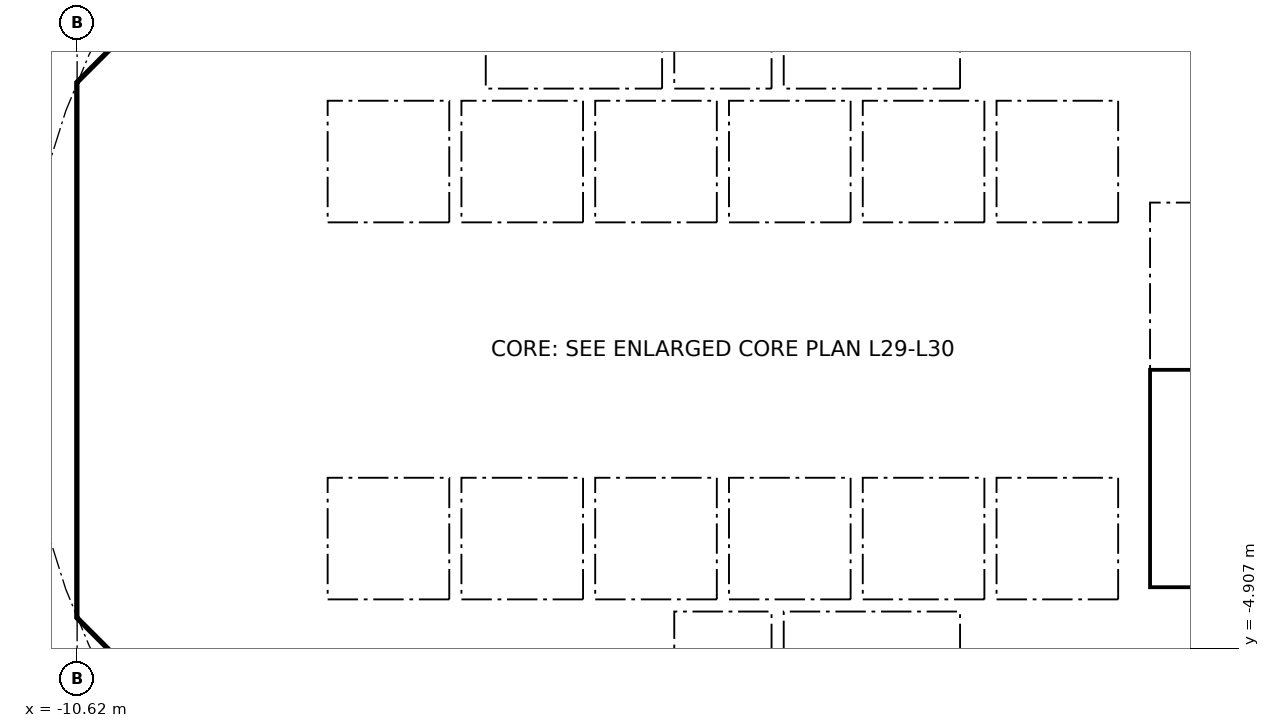
"""IFC4 building model, lengths in metres.
Left out: names, types, materials, properties, quantities, classifications, styles, units other than length and angle.
Written with IfcOpenShell. Run it as: python <this file> out.ifc"""

import sys

from ifc_helpers import new_model, si_unit, direction, frame, frame_2d, origin, place, context, subcontext, project, spatial, polyline, rectangle, outline, extrude, element, fill, save


model = new_model("IFC4")
c1 = context("Model", 3, precision=1e-05, world=origin(), true_north=direction((0.0, 1.0)))
c2 = subcontext(c1, "Body", "Model", "MODEL_VIEW")
j1 = project(units=[si_unit("LENGTHUNIT", "METRE"), si_unit("PLANEANGLEUNIT", "RADIAN")], contexts=[c1])
p1 = place(None, origin())
s1 = spatial("IfcSite", under=j1, at=p1, CompositionType="ELEMENT")
p2 = place(p1, origin())
s2 = spatial("IfcBuilding", under=s1, at=p2, CompositionType="ELEMENT")
p3 = place(p2, frame((0.0, 0.0, 119.6)))
s3 = spatial("IfcBuildingStorey", under=s2, at=p3, CompositionType="ELEMENT", Elevation=119.6)
p4 = place(p3, frame((9.988, 4.613, 0.0), z_axis=(0.0, 0.0, 1.0), x_axis=(-0.707106781187, 0.707106781187, 0.0)))
e1 = element("IfcWall", 1, at=p4, inside=s3, PredefinedType="SHEAR", context=c2, shape_type="SweptSolid", body=[
    extrude(rectangle(XDim=7.602, YDim=0.6, at=frame_2d((3.801, 0.0))), origin(), (0.0, 0.0, 1.0), 3.44),
])
p5 = place(p4, frame((3.201, 0.0, 0.0)))
e2 = element("IfcOpeningElement", 2, at=p5, cuts=e1, PredefinedType="OPENING", context=c2, shape_type="SweptSolid", body=[
    extrude(rectangle(XDim=1.2, YDim=2.1, at=frame_2d((0.6, 1.05))), frame((0.0, 0.31, 0.0), z_axis=(0.0, -1.0, 0.0), x_axis=(1.0, 0.0, 0.0)), (0.0, 0.0, 1.0), 0.62),
])
p6 = place(p3, frame((-4.613, 9.988, 0.0), z_axis=(0.0, 0.0, 1.0), x_axis=(-0.707106781187, -0.707106781187, 0.0)))
e3 = element("IfcWall", 3, at=p6, inside=s3, PredefinedType="SHEAR", context=c2, shape_type="SweptSolid", body=[
    extrude(rectangle(XDim=7.602, YDim=0.6, at=frame_2d((3.801, 0.0))), origin(), (0.0, 0.0, 1.0), 3.44),
])
p7 = place(p6, frame((0.351, 0.0, 0.0)))
e4 = element("IfcOpeningElement", 4, at=p7, cuts=e3, PredefinedType="OPENING", context=c2, shape_type="SweptSolid", body=[
    extrude(rectangle(XDim=1.1, YDim=2.1, at=frame_2d((0.55, 1.05))), frame((0.0, 0.31, 0.0), z_axis=(0.0, -1.0, 0.0), x_axis=(1.0, 0.0, 0.0)), (0.0, 0.0, 1.0), 0.62),
])
p8 = place(p3, frame((-10.325, 3.801, 0.0), z_axis=(0.0, 0.0, 1.0), x_axis=(0.0, -1.0, 0.0)))
e5 = element("IfcWall", 5, at=p8, inside=s3, PredefinedType="SHEAR", context=c2, shape_type="SweptSolid", body=[
    extrude(rectangle(XDim=7.602, YDim=0.6, at=frame_2d((3.801, 0.0))), origin(), (0.0, 0.0, 1.0), 3.44),
])
p9 = place(p8, frame((0.651, 0.0, 0.0)))
e6 = element("IfcOpeningElement", 6, at=p9, cuts=e5, PredefinedType="OPENING", context=c2, shape_type="SweptSolid", body=[
    extrude(rectangle(XDim=1.5, YDim=2.1, at=frame_2d((0.75, 1.05))), frame((0.0, 0.31, 0.0), z_axis=(0.0, -1.0, 0.0), x_axis=(1.0, 0.0, 0.0)), (0.0, 0.0, 1.0), 0.62),
])
p10 = place(p8, frame((5.451, 0.0, 0.0)))
e7 = element("IfcOpeningElement", 7, at=p10, cuts=e5, PredefinedType="OPENING", context=c2, shape_type="SweptSolid", body=[
    extrude(rectangle(XDim=1.5, YDim=2.1, at=frame_2d((0.75, 1.05))), frame((0.0, 0.31, 0.0), z_axis=(0.0, -1.0, 0.0), x_axis=(1.0, 0.0, 0.0)), (0.0, 0.0, 1.0), 0.62),
])
p11 = place(p3, frame((-9.988, -4.613, 0.0), z_axis=(0.0, 0.0, 1.0), x_axis=(0.707106781187, -0.707106781187, 0.0)))
e8 = element("IfcWall", 8, at=p11, inside=s3, PredefinedType="SHEAR", context=c2, shape_type="SweptSolid", body=[
    extrude(rectangle(XDim=7.602, YDim=0.6, at=frame_2d((3.801, 0.0))), origin(), (0.0, 0.0, 1.0), 3.44),
])
p12 = place(p11, frame((6.151, 0.0, 0.0)))
e9 = element("IfcOpeningElement", 9, at=p12, cuts=e8, PredefinedType="OPENING", context=c2, shape_type="SweptSolid", body=[
    extrude(rectangle(XDim=1.1, YDim=2.1, at=frame_2d((0.55, 1.05))), frame((0.0, 0.31, 0.0), z_axis=(0.0, -1.0, 0.0), x_axis=(1.0, 0.0, 0.0)), (0.0, 0.0, 1.0), 0.62),
])
p13 = place(p3, frame((4.613, -9.988, 0.0), z_axis=(0.0, 0.0, 1.0), x_axis=(0.707106781187, 0.707106781187, 0.0)))
e10 = element("IfcWall", 10, at=p13, inside=s3, PredefinedType="SHEAR", context=c2, shape_type="SweptSolid", body=[
    extrude(rectangle(XDim=7.602, YDim=0.6, at=frame_2d((3.801, 0.0))), origin(), (0.0, 0.0, 1.0), 3.44),
])
p14 = place(p13, frame((3.201, 0.0, 0.0)))
e11 = element("IfcOpeningElement", 11, at=p14, cuts=e10, PredefinedType="OPENING", context=c2, shape_type="SweptSolid", body=[
    extrude(rectangle(XDim=1.2, YDim=2.1, at=frame_2d((0.6, 1.05))), frame((0.0, 0.31, 0.0), z_axis=(0.0, -1.0, 0.0), x_axis=(1.0, 0.0, 0.0)), (0.0, 0.0, 1.0), 0.62),
])
p15 = place(p3, frame((-5.8, 4.3, 0.0), z_axis=(0.0, 0.0, 1.0), x_axis=(0.0, 1.0, 0.0)))
e12 = element("IfcWall", 12, at=p15, inside=s3, PredefinedType="PARTITIONING", context=c2, shape_type="SweptSolid", body=[
    extrude(rectangle(XDim=3.927, YDim=0.15, at=frame_2d((1.963, 0.0))), origin(), (0.0, 0.0, 1.0), 3.44),
])
p16 = place(p15, frame((1.551, 0.0, 0.0)))
e13 = element("IfcOpeningElement", 13, at=p16, cuts=e12, PredefinedType="OPENING", context=c2, shape_type="SweptSolid", body=[
    extrude(rectangle(XDim=0.9, YDim=2.1, at=frame_2d((0.45, 1.05))), frame((0.0, 0.085, 0.0), z_axis=(0.0, -1.0, 0.0), x_axis=(1.0, 0.0, 0.0)), (0.0, 0.0, 1.0), 0.17),
])
p17 = place(p3, frame((4.0, 4.3, 0.0), z_axis=(0.0, 0.0, 1.0), x_axis=(0.0, 1.0, 0.0)))
e14 = element("IfcWall", 14, at=p17, inside=s3, PredefinedType="SOLIDWALL", context=c2, shape_type="SweptSolid", body=[
    extrude(rectangle(XDim=2.2, YDim=0.2, at=frame_2d((1.1, 0.0))), origin(), (0.0, 0.0, 1.0), 3.44),
])
p18 = place(p17, frame((0.55, 0.0, 0.0)))
e15 = element("IfcOpeningElement", 15, at=p18, cuts=e14, PredefinedType="OPENING", context=c2, shape_type="SweptSolid", body=[
    extrude(rectangle(XDim=1.1, YDim=2.1, at=frame_2d((0.55, 1.05))), frame((0.0, 0.11, 0.0), z_axis=(0.0, -1.0, 0.0), x_axis=(1.0, 0.0, 0.0)), (0.0, 0.0, 1.0), 0.22),
])
p19 = place(p3, frame((-4.0, 4.3, 0.0), z_axis=(0.0, 0.0, 1.0), x_axis=(0.0, 1.0, 0.0)))
e16 = element("IfcWall", 16, at=p19, inside=s3, PredefinedType="SOLIDWALL", context=c2, shape_type="SweptSolid", body=[
    extrude(rectangle(XDim=2.2, YDim=0.2, at=frame_2d((1.1, 0.0))), origin(), (0.0, 0.0, 1.0), 3.44),
])
p20 = place(p19, frame((0.55, 0.0, 0.0)))
e17 = element("IfcOpeningElement", 17, at=p20, cuts=e16, PredefinedType="OPENING", context=c2, shape_type="SweptSolid", body=[
    extrude(rectangle(XDim=1.1, YDim=2.1, at=frame_2d((0.55, 1.05))), frame((0.0, 0.11, 0.0), z_axis=(0.0, -1.0, 0.0), x_axis=(1.0, 0.0, 0.0)), (0.0, 0.0, 1.0), 0.22),
])
p21 = place(p3, frame((-6.7, 2.0, 0.0), z_axis=(0.0, 0.0, 1.0), x_axis=(1.0, 0.0, 0.0)))
e18 = element("IfcWall", 18, at=p21, inside=s3, PredefinedType="SOLIDWALL", context=c2, shape_type="SweptSolid", body=[
    extrude(rectangle(XDim=13.4, YDim=0.2, at=frame_2d((6.7, 0.0))), origin(), (0.0, 0.0, 1.0), 3.44),
])
p22 = place(p21, frame((0.65, 0.0, 0.0)))
e19 = element("IfcOpeningElement", 19, at=p22, cuts=e18, PredefinedType="OPENING", context=c2, shape_type="SweptSolid", body=[
    extrude(rectangle(XDim=1.1, YDim=2.1, at=frame_2d((0.55, 1.05))), frame((0.0, 0.11, 0.0), z_axis=(0.0, -1.0, 0.0), x_axis=(1.0, 0.0, 0.0)), (0.0, 0.0, 1.0), 0.22),
])
p23 = place(p21, frame((2.85, 0.0, 0.0)))
e20 = element("IfcOpeningElement", 20, at=p23, cuts=e18, PredefinedType="OPENING", context=c2, shape_type="SweptSolid", body=[
    extrude(rectangle(XDim=1.1, YDim=2.1, at=frame_2d((0.55, 1.05))), frame((0.0, 0.11, 0.0), z_axis=(0.0, -1.0, 0.0), x_axis=(1.0, 0.0, 0.0)), (0.0, 0.0, 1.0), 0.22),
])
p24 = place(p21, frame((5.05, 0.0, 0.0)))
e21 = element("IfcOpeningElement", 21, at=p24, cuts=e18, PredefinedType="OPENING", context=c2, shape_type="SweptSolid", body=[
    extrude(rectangle(XDim=1.1, YDim=2.1, at=frame_2d((0.55, 1.05))), frame((0.0, 0.11, 0.0), z_axis=(0.0, -1.0, 0.0), x_axis=(1.0, 0.0, 0.0)), (0.0, 0.0, 1.0), 0.22),
])
p25 = place(p3, frame((6.7, 4.0, 0.0), z_axis=(0.0, 0.0, 1.0), x_axis=(1.0, 0.0, 0.0)))
e22 = element("IfcWall", 22, at=p25, inside=s3, PredefinedType="SOLIDWALL", context=c2, shape_type="SweptSolid", body=[
    extrude(rectangle(XDim=3.325, YDim=0.2, at=frame_2d((1.662, 0.0))), origin(), (0.0, 0.0, 1.0), 3.44),
])
p26 = place(p25, frame((1.25, 0.0, 0.0)))
e23 = element("IfcOpeningElement", 23, at=p26, cuts=e22, PredefinedType="OPENING", context=c2, shape_type="SweptSolid", body=[
    extrude(rectangle(XDim=1.1, YDim=2.1, at=frame_2d((0.55, 1.05))), frame((0.0, 0.11, 0.0), z_axis=(0.0, -1.0, 0.0), x_axis=(1.0, 0.0, 0.0)), (0.0, 0.0, 1.0), 0.22),
])
p27 = place(p3, frame((-5.8, -8.227, 0.0), z_axis=(0.0, 0.0, 1.0), x_axis=(0.0, 1.0, 0.0)))
e24 = element("IfcWall", 24, at=p27, inside=s3, PredefinedType="PARTITIONING", context=c2, shape_type="SweptSolid", body=[
    extrude(rectangle(XDim=3.927, YDim=0.15, at=frame_2d((1.963, 0.0))), origin(), (0.0, 0.0, 1.0), 3.44),
])
p28 = place(p27, frame((1.476, 0.0, 0.0)))
e25 = element("IfcOpeningElement", 25, at=p28, cuts=e24, PredefinedType="OPENING", context=c2, shape_type="SweptSolid", body=[
    extrude(rectangle(XDim=0.9, YDim=2.1, at=frame_2d((0.45, 1.05))), frame((0.0, 0.085, 0.0), z_axis=(0.0, -1.0, 0.0), x_axis=(1.0, 0.0, 0.0)), (0.0, 0.0, 1.0), 0.17),
])
p29 = place(p3, frame((4.0, -6.5, 0.0), z_axis=(0.0, 0.0, 1.0), x_axis=(0.0, 1.0, 0.0)))
e26 = element("IfcWall", 26, at=p29, inside=s3, PredefinedType="SOLIDWALL", context=c2, shape_type="SweptSolid", body=[
    extrude(rectangle(XDim=2.2, YDim=0.2, at=frame_2d((1.1, 0.0))), origin(), (0.0, 0.0, 1.0), 3.44),
])
p30 = place(p29, frame((0.55, 0.0, 0.0)))
e27 = element("IfcOpeningElement", 27, at=p30, cuts=e26, PredefinedType="OPENING", context=c2, shape_type="SweptSolid", body=[
    extrude(rectangle(XDim=1.1, YDim=2.1, at=frame_2d((0.55, 1.05))), frame((0.0, 0.11, 0.0), z_axis=(0.0, -1.0, 0.0), x_axis=(1.0, 0.0, 0.0)), (0.0, 0.0, 1.0), 0.22),
])
p31 = place(p3, frame((-4.0, -6.5, 0.0), z_axis=(0.0, 0.0, 1.0), x_axis=(0.0, 1.0, 0.0)))
e28 = element("IfcWall", 28, at=p31, inside=s3, PredefinedType="SOLIDWALL", context=c2, shape_type="SweptSolid", body=[
    extrude(rectangle(XDim=2.2, YDim=0.2, at=frame_2d((1.1, 0.0))), origin(), (0.0, 0.0, 1.0), 3.44),
])
p32 = place(p31, frame((0.65, 0.0, 0.0)))
e29 = element("IfcOpeningElement", 29, at=p32, cuts=e28, PredefinedType="OPENING", context=c2, shape_type="SweptSolid", body=[
    extrude(rectangle(XDim=0.9, YDim=2.1, at=frame_2d((0.45, 1.05))), frame((0.0, 0.11, 0.0), z_axis=(0.0, -1.0, 0.0), x_axis=(1.0, 0.0, 0.0)), (0.0, 0.0, 1.0), 0.22),
])
p33 = place(p3, frame((-6.7, -2.0, 0.0), z_axis=(0.0, 0.0, 1.0), x_axis=(1.0, 0.0, 0.0)))
e30 = element("IfcWall", 30, at=p33, inside=s3, PredefinedType="SOLIDWALL", context=c2, shape_type="SweptSolid", body=[
    extrude(rectangle(XDim=13.4, YDim=0.2, at=frame_2d((6.7, 0.0))), origin(), (0.0, 0.0, 1.0), 3.44),
])
p34 = place(p33, frame((0.65, 0.0, 0.0)))
e31 = element("IfcOpeningElement", 31, at=p34, cuts=e30, PredefinedType="OPENING", context=c2, shape_type="SweptSolid", body=[
    extrude(rectangle(XDim=1.1, YDim=2.1, at=frame_2d((0.55, 1.05))), frame((0.0, 0.11, 0.0), z_axis=(0.0, -1.0, 0.0), x_axis=(1.0, 0.0, 0.0)), (0.0, 0.0, 1.0), 0.22),
])
p35 = place(p33, frame((2.85, 0.0, 0.0)))
e32 = element("IfcOpeningElement", 32, at=p35, cuts=e30, PredefinedType="OPENING", context=c2, shape_type="SweptSolid", body=[
    extrude(rectangle(XDim=1.1, YDim=2.1, at=frame_2d((0.55, 1.05))), frame((0.0, 0.11, 0.0), z_axis=(0.0, -1.0, 0.0), x_axis=(1.0, 0.0, 0.0)), (0.0, 0.0, 1.0), 0.22),
])
p36 = place(p3, origin())
e33 = element("IfcWall", 33, at=p36, inside=s3, PredefinedType="SHEAR", context=c2, shape_type="SweptSolid", body=[
    extrude(outline(polyline([(-10.625, -3.801), (-10.025, -3.801), (-10.025, -4.152), (-9.776, -4.401), (-10.2, -4.825), (-10.625, -4.401), (-10.625, -3.801)])), origin(), (0.0, 0.0, 1.0), 3.44),
])
p37 = place(p3, origin())
e34 = element("IfcWall", 34, at=p37, inside=s3, PredefinedType="SHEAR", context=c2, shape_type="SweptSolid", body=[
    extrude(outline(polyline([(-10.2, 4.825), (-9.776, 4.401), (-10.025, 4.152), (-10.025, 3.801), (-10.625, 3.801), (-10.625, 4.401), (-10.2, 4.825)])), origin(), (0.0, 0.0, 1.0), 3.44),
])
for number, where, z_axis, x_axis in (
    (35, (-0.9, -6.5, 0.0), (0.0, 0.0, 1.0), (0.0, 1.0, 0.0)),
    (36, (0.9, -6.5, 0.0), (0.0, 0.0, 1.0), (0.0, 1.0, 0.0)),
):
    element("IfcWall", number, at=place(p3, frame(where, z_axis=z_axis, x_axis=x_axis)), inside=s3, PredefinedType="SOLIDWALL", context=c2, shape_type="SweptSolid", body=[
        extrude(rectangle(XDim=2.2, YDim=0.2, at=frame_2d((1.1, 0.0))), origin(), (0.0, 0.0, 1.0), 3.44),
    ])
p38 = place(p3, origin())
e37 = element("IfcWall", 37, at=p38, inside=s3, PredefinedType="SOLIDWALL", context=c2, shape_type="SweptSolid", body=[
    extrude(outline(polyline([(-6.7, -2.1), (-6.5, -2.1), (-6.5, -4.1), (-4.5, -4.1), (-4.5, -2.1), (-4.3, -2.1), (-4.3, -4.1), (-2.3, -4.1), (-2.3, -2.1), (-2.1, -2.1), (-2.1, -4.1), (-0.1, -4.1), (-0.1, -2.1), (0.1, -2.1), (0.1, -4.1), (2.1, -4.1), (2.1, -2.1), (2.3, -2.1), (2.3, -4.1), (4.3, -4.1), (4.3, -2.1), (4.5, -2.1), (4.5, -4.1), (6.5, -4.1), (6.5, -2.1), (6.7, -2.1), (6.7, -4.3), (-6.7, -4.3), (-6.7, -2.1)])), origin(), (0.0, 0.0, 1.0), 3.44),
])
for number, where, z_axis, x_axis in (
    (38, (-0.9, 4.3, 0.0), (0.0, 0.0, 1.0), (0.0, 1.0, 0.0)),
    (39, (0.9, 4.3, 0.0), (0.0, 0.0, 1.0), (0.0, 1.0, 0.0)),
):
    element("IfcWall", number, at=place(p3, frame(where, z_axis=z_axis, x_axis=x_axis)), inside=s3, PredefinedType="SOLIDWALL", context=c2, shape_type="SweptSolid", body=[
        extrude(rectangle(XDim=2.2, YDim=0.2, at=frame_2d((1.1, 0.0))), origin(), (0.0, 0.0, 1.0), 3.44),
    ])
p39 = place(p3, origin())
e40 = element("IfcWall", 40, at=p39, inside=s3, PredefinedType="SOLIDWALL", context=c2, shape_type="SweptSolid", body=[
    extrude(outline(polyline([(-6.5, 2.1), (-6.7, 2.1), (-6.7, 4.3), (6.7, 4.3), (6.7, 2.1), (6.5, 2.1), (6.5, 4.1), (4.5, 4.1), (4.5, 2.1), (4.3, 2.1), (4.3, 4.1), (2.3, 4.1), (2.3, 2.1), (2.1, 2.1), (2.1, 4.1), (0.1, 4.1), (0.1, 2.1), (-0.1, 2.1), (-0.1, 4.1), (-2.1, 4.1), (-2.1, 2.1), (-2.3, 2.1), (-2.3, 4.1), (-4.3, 4.1), (-4.3, 2.1), (-4.5, 2.1), (-4.5, 4.1), (-6.5, 4.1), (-6.5, 2.1)])), origin(), (0.0, 0.0, 1.0), 3.44),
])
for number, where, z_axis, x_axis in (
    (41, (-10.025, -4.0, 0.0), (0.0, 0.0, 1.0), (1.0, 0.0, 0.0)),
    (42, (-10.025, 4.0, 0.0), (0.0, 0.0, 1.0), (1.0, 0.0, 0.0)),
):
    element("IfcWall", number, at=place(p3, frame(where, z_axis=z_axis, x_axis=x_axis)), inside=s3, PredefinedType="PARTITIONING", context=c2, shape_type="SweptSolid", body=[
        extrude(rectangle(XDim=3.325, YDim=0.2, at=frame_2d((1.662, 0.0))), origin(), (0.0, 0.0, 1.0), 3.44),
    ])
p40 = place(p3, origin())
e43 = element("IfcWall", 43, at=p40, inside=s3, PredefinedType="SOLIDWALL", context=c2, shape_type="SweptSolid", body=[
    extrude(outline(polyline([(7.025, -3.9), (6.7, -3.9), (6.7, 3.9), (7.025, 3.9), (7.025, -3.9)])), origin(), (0.0, 0.0, 1.0), 3.44),
])
p41 = place(p3, origin())
e44 = element("IfcWall", 44, at=p41, inside=s3, PredefinedType="SOLIDWALL", context=c2, shape_type="SweptSolid", body=[
    extrude(outline(polyline([(10.025, -4.1), (6.7, -4.1), (6.7, -3.9), (10.025, -3.9), (10.025, -4.1)])), origin(), (0.0, 0.0, 1.0), 3.44),
])
p42 = place(p22, origin())
e45 = element("IfcDoor", 45, at=p42, inside=s3, OperationType="DOUBLE_DOOR_SLIDING", PredefinedType="DOOR", context=c2, shape_type="SweptSolid", body=[
    extrude(rectangle(XDim=1.1, YDim=2.1, at=frame_2d((0.55, 1.05))), frame((0.0, 0.025, 0.0), z_axis=(0.0, -1.0, 0.0), x_axis=(1.0, 0.0, 0.0)), (0.0, 0.0, 1.0), 0.05),
])
fill(e19, e45)
p43 = place(p23, origin())
e46 = element("IfcDoor", 46, at=p43, inside=s3, OperationType="DOUBLE_DOOR_SLIDING", PredefinedType="DOOR", context=c2, shape_type="SweptSolid", body=[
    extrude(rectangle(XDim=1.1, YDim=2.1, at=frame_2d((0.55, 1.05))), frame((0.0, 0.025, 0.0), z_axis=(0.0, -1.0, 0.0), x_axis=(1.0, 0.0, 0.0)), (0.0, 0.0, 1.0), 0.05),
])
fill(e20, e46)
p44 = place(p24, origin())
e47 = element("IfcDoor", 47, at=p44, inside=s3, OperationType="DOUBLE_DOOR_SLIDING", PredefinedType="DOOR", context=c2, shape_type="SweptSolid", body=[
    extrude(rectangle(XDim=1.1, YDim=2.1, at=frame_2d((0.55, 1.05))), frame((0.0, 0.025, 0.0), z_axis=(0.0, -1.0, 0.0), x_axis=(1.0, 0.0, 0.0)), (0.0, 0.0, 1.0), 0.05),
])
fill(e21, e47)
p45 = place(p34, origin())
e48 = element("IfcDoor", 48, at=p45, inside=s3, OperationType="DOUBLE_DOOR_SLIDING", PredefinedType="DOOR", context=c2, shape_type="SweptSolid", body=[
    extrude(rectangle(XDim=1.1, YDim=2.1, at=frame_2d((0.55, 1.05))), frame((0.0, 0.025, 0.0), z_axis=(0.0, -1.0, 0.0), x_axis=(1.0, 0.0, 0.0)), (0.0, 0.0, 1.0), 0.05),
])
fill(e31, e48)
p46 = place(p35, origin())
e49 = element("IfcDoor", 49, at=p46, inside=s3, OperationType="DOUBLE_DOOR_SLIDING", PredefinedType="DOOR", context=c2, shape_type="SweptSolid", body=[
    extrude(rectangle(XDim=1.1, YDim=2.1, at=frame_2d((0.55, 1.05))), frame((0.0, 0.025, 0.0), z_axis=(0.0, -1.0, 0.0), x_axis=(1.0, 0.0, 0.0)), (0.0, 0.0, 1.0), 0.05),
])
fill(e32, e49)
p47 = place(p18, origin())
e50 = element("IfcDoor", 50, at=p47, inside=s3, OperationType="DOUBLE_DOOR_SLIDING", PredefinedType="DOOR", context=c2, shape_type="SweptSolid", body=[
    extrude(rectangle(XDim=1.1, YDim=2.1, at=frame_2d((0.55, 1.05))), frame((0.0, 0.025, 0.0), z_axis=(0.0, -1.0, 0.0), x_axis=(1.0, 0.0, 0.0)), (0.0, 0.0, 1.0), 0.05),
])
fill(e15, e50)
p48 = place(p30, origin())
e51 = element("IfcDoor", 51, at=p48, inside=s3, OperationType="DOUBLE_DOOR_SLIDING", PredefinedType="DOOR", context=c2, shape_type="SweptSolid", body=[
    extrude(rectangle(XDim=1.1, YDim=2.1, at=frame_2d((0.55, 1.05))), frame((0.0, 0.025, 0.0), z_axis=(0.0, -1.0, 0.0), x_axis=(1.0, 0.0, 0.0)), (0.0, 0.0, 1.0), 0.05),
])
fill(e27, e51)
p49 = place(p20, origin())
e52 = element("IfcDoor", 52, at=p49, inside=s3, OperationType="DOUBLE_DOOR_SLIDING", PredefinedType="DOOR", context=c2, shape_type="SweptSolid", body=[
    extrude(rectangle(XDim=1.1, YDim=2.1, at=frame_2d((0.55, 1.05))), frame((0.0, 0.025, 0.0), z_axis=(0.0, -1.0, 0.0), x_axis=(1.0, 0.0, 0.0)), (0.0, 0.0, 1.0), 0.05),
])
fill(e17, e52)
p50 = place(p9, origin())
e53 = element("IfcDoor", 53, at=p50, inside=s3, OperationType="DOUBLE_DOOR_SINGLE_SWING", PredefinedType="DOOR", context=c2, shape_type="SweptSolid", body=[
    extrude(rectangle(XDim=1.5, YDim=2.1, at=frame_2d((0.75, 1.05))), frame((0.0, 0.025, 0.0), z_axis=(0.0, -1.0, 0.0), x_axis=(1.0, 0.0, 0.0)), (0.0, 0.0, 1.0), 0.05),
])
fill(e6, e53)
p51 = place(p10, origin())
e54 = element("IfcDoor", 54, at=p51, inside=s3, OperationType="DOUBLE_DOOR_SINGLE_SWING", PredefinedType="DOOR", context=c2, shape_type="SweptSolid", body=[
    extrude(rectangle(XDim=1.5, YDim=2.1, at=frame_2d((0.75, 1.05))), frame((0.0, 0.025, 0.0), z_axis=(0.0, -1.0, 0.0), x_axis=(1.0, 0.0, 0.0)), (0.0, 0.0, 1.0), 0.05),
])
fill(e7, e54)
save(model, sys.argv[1])
